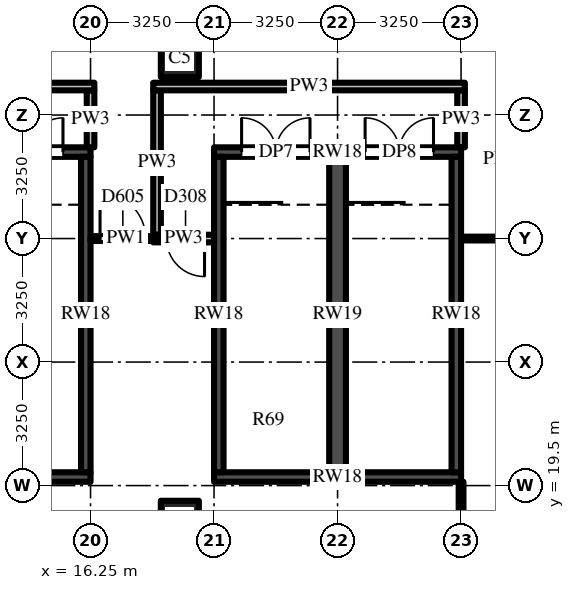
"""IFC4 building model, lengths in metres.
Left out: names, types, materials, properties, quantities, classifications, styles, units other than length and angle.
Written with IfcOpenShell. Run it as: python <this file> out.ifc"""

import sys

from ifc_helpers import new_model, si_unit, direction, frame, frame_2d, origin, origin_2d, place, context, subcontext, project, spatial, rectangle, extrude, source, transform, mapped, element, fill, save


model = new_model("IFC4")
c1 = context("Model", 3, precision=1e-05, world=origin(), true_north=direction((0.0, 1.0)))
c2 = subcontext(c1, "Body", "Model", "MODEL_VIEW")
j1 = project(units=[si_unit("LENGTHUNIT", "METRE"), si_unit("PLANEANGLEUNIT", "RADIAN")], contexts=[c1])
p1 = place(None, origin())
s1 = spatial("IfcSite", under=j1, at=p1, CompositionType="ELEMENT")
p2 = place(p1, origin())
s2 = spatial("IfcBuilding", under=s1, at=p2, CompositionType="ELEMENT")
p3 = place(p2, frame((0.0, 0.0, 29.0)))
s3 = spatial("IfcBuildingStorey", under=s2, at=p3, CompositionType="ELEMENT", Elevation=29.0)
m1 = source(origin(), c2, "Body", "SweptSolid", [
    extrude(rectangle(XDim=1.0, YDim=1.0, at=origin_2d()), origin(), (0.0, 0.0, 1.0), 5.0),
])
for number, where, z_axis, x_axis in (
    (1, (18.6, 18.6, 0.0), (0.0, 0.0, 1.0), (1.0, 0.0, 0.0)),
    (2, (18.6, 30.75, 0.0), (0.0, 0.0, 1.0), (1.0, 0.0, 0.0)),
):
    element("IfcColumn", number, at=place(p3, frame(where, z_axis=z_axis, x_axis=x_axis)), inside=s3, PredefinedType="COLUMN", context=c2, shape_type="MappedRepresentation", body=[
        mapped(m1, transform((0.0, 0.0, 0.0))),
    ])
m2 = source(origin(), c2, "Body", "SweptSolid", [
    extrude(rectangle(XDim=6.5, YDim=0.25, at=frame_2d((3.25, 0.0))), origin(), (0.0, 0.0, 1.0), 4.65),
])
p4 = place(p3, frame((9.75, 28.275, 0.0), z_axis=(0.0, 0.0, 1.0), x_axis=(1.0, 0.0, 0.0)))
e3 = element("IfcWall", 3, at=p4, inside=s3, PredefinedType="SHEAR", context=c2, shape_type="MappedRepresentation", body=[
    mapped(m2, transform((0.0, 0.0, 0.0))),
])
m3 = source(origin(), c2, "Body", "SweptSolid", [
    extrude(rectangle(XDim=1.8, YDim=2.1, at=frame_2d((0.9, 1.05))), frame((0.0, 0.135, 0.0), z_axis=(0.0, -1.0, 0.0), x_axis=(1.0, 0.0, 0.0)), (0.0, 0.0, 1.0), 0.27),
])
p5 = place(p4, frame((0.725, 0.0, 0.0)))
e4 = element("IfcOpeningElement", 4, at=p5, cuts=e3, PredefinedType="OPENING", context=c2, shape_type="MappedRepresentation", body=[
    mapped(m3, transform((0.0, 0.0, 0.0))),
])
p6 = place(p4, frame((3.975, 0.0, 0.0)))
e5 = element("IfcOpeningElement", 5, at=p6, cuts=e3, PredefinedType="OPENING", context=c2, shape_type="MappedRepresentation", body=[
    mapped(m3, transform((0.0, 0.0, 0.0))),
])
p7 = place(p3, frame((9.75, 19.725, 0.0), z_axis=(0.0, 0.0, 1.0), x_axis=(1.0, 0.0, 0.0)))
e6 = element("IfcWall", 6, at=p7, inside=s3, PredefinedType="SHEAR", context=c2, shape_type="MappedRepresentation", body=[
    mapped(m2, transform((0.0, 0.0, 0.0))),
])
m4 = source(origin(), c2, "Body", "SweptSolid", [
    extrude(rectangle(XDim=8.3, YDim=0.25, at=frame_2d((4.15, 0.0))), origin(), (0.0, 0.0, 1.0), 4.65),
])
p8 = place(p3, frame((16.125, 19.85, 0.0), z_axis=(0.0, 0.0, 1.0), x_axis=(0.0, 1.0, 0.0)))
e7 = element("IfcWall", 7, at=p8, inside=s3, PredefinedType="SHEAR", context=c2, shape_type="MappedRepresentation", body=[
    mapped(m4, transform((0.0, 0.0, 0.0))),
])
p9 = place(p3, frame((19.5, 28.275, 0.0), z_axis=(0.0, 0.0, 1.0), x_axis=(1.0, 0.0, 0.0)))
e8 = element("IfcWall", 8, at=p9, inside=s3, PredefinedType="SHEAR", context=c2, shape_type="MappedRepresentation", body=[
    mapped(m2, transform((0.0, 0.0, 0.0))),
])
p10 = place(p9, frame((0.725, 0.0, 0.0)))
e9 = element("IfcOpeningElement", 9, at=p10, cuts=e8, PredefinedType="OPENING", context=c2, shape_type="MappedRepresentation", body=[
    mapped(m3, transform((0.0, 0.0, 0.0))),
])
p11 = place(p9, frame((3.975, 0.0, 0.0)))
e10 = element("IfcOpeningElement", 10, at=p11, cuts=e8, PredefinedType="OPENING", context=c2, shape_type="MappedRepresentation", body=[
    mapped(m3, transform((0.0, 0.0, 0.0))),
])
p12 = place(p3, frame((19.5, 19.725, 0.0), z_axis=(0.0, 0.0, 1.0), x_axis=(1.0, 0.0, 0.0)))
e11 = element("IfcWall", 11, at=p12, inside=s3, PredefinedType="SHEAR", context=c2, shape_type="MappedRepresentation", body=[
    mapped(m2, transform((0.0, 0.0, 0.0))),
])
for number, where, z_axis, x_axis in (
    (12, (19.625, 19.85, 0.0), (0.0, 0.0, 1.0), (0.0, 1.0, 0.0)),
    (13, (25.875, 19.85, 0.0), (0.0, 0.0, 1.0), (0.0, 1.0, 0.0)),
):
    element("IfcWall", number, at=place(p3, frame(where, z_axis=z_axis, x_axis=x_axis)), inside=s3, PredefinedType="SHEAR", context=c2, shape_type="MappedRepresentation", body=[
        mapped(m4, transform((0.0, 0.0, 0.0))),
    ])
m5 = source(origin(), c2, "Body", "SweptSolid", [
    extrude(rectangle(XDim=8.3, YDim=0.44, at=frame_2d((4.15, 0.0))), origin(), (0.0, 0.0, 1.0), 4.65),
])
p13 = place(p3, frame((22.75, 19.85, 0.0), z_axis=(0.0, 0.0, 1.0), x_axis=(0.0, 1.0, 0.0)))
e14 = element("IfcWall", 14, at=p13, inside=s3, PredefinedType="SHEAR", context=c2, shape_type="MappedRepresentation", body=[
    mapped(m5, transform((0.0, 0.0, 0.0))),
])
m6 = source(origin(), c2, "Body", "SweptSolid", [
    extrude(rectangle(XDim=1.5, YDim=0.2, at=frame_2d((0.75, 0.0))), origin(), (0.0, 0.0, 1.0), 4.65),
])
p14 = place(p3, frame((16.25, 29.9, 0.0), z_axis=(0.0, 0.0, 1.0), x_axis=(0.0, -1.0, 0.0)))
e15 = element("IfcWall", 15, at=p14, inside=s3, PredefinedType="PARTITIONING", context=c2, shape_type="MappedRepresentation", body=[
    mapped(m6, transform((0.0, 0.0, 0.0))),
])
m7 = source(origin(), c2, "Body", "SweptSolid", [
    extrude(rectangle(XDim=3.8, YDim=0.2, at=frame_2d((1.9, 0.0))), origin(), (0.0, 0.0, 1.0), 4.224),
])
p15 = place(p3, frame((18.0, 29.9, 0.0), z_axis=(0.0, 0.0, 1.0), x_axis=(0.0, -1.0, 0.0)))
e16 = element("IfcWall", 16, at=p15, inside=s3, PredefinedType="PARTITIONING", context=c2, shape_type="MappedRepresentation", body=[
    mapped(m7, transform((0.0, 0.0, 0.0))),
])
p16 = place(p3, frame((26.0, 29.9, 0.0), z_axis=(0.0, 0.0, 1.0), x_axis=(0.0, -1.0, 0.0)))
e17 = element("IfcWall", 17, at=p16, inside=s3, PredefinedType="PARTITIONING", context=c2, shape_type="MappedRepresentation", body=[
    mapped(m6, transform((0.0, 0.0, 0.0))),
])
m8 = source(origin(), c2, "Body", "SweptSolid", [
    extrude(rectangle(XDim=16.25, YDim=0.125, at=frame_2d((8.125, 0.0))), origin(), (0.0, 0.0, 1.0), 2.83),
])
p17 = place(p3, frame((26.0, 19.6, 0.0), z_axis=(0.0, 0.0, 1.0), x_axis=(0.0, -1.0, 0.0)))
e18 = element("IfcWall", 18, at=p17, inside=s3, PredefinedType="PARTITIONING", context=c2, shape_type="MappedRepresentation", body=[
    mapped(m8, transform((0.0, 0.0, 0.0))),
])
m9 = source(origin(), c2, "Body", "SweptSolid", [
    extrude(rectangle(XDim=1.0, YDim=2.1, at=frame_2d((0.5, 1.05))), frame((0.0, 0.073, 0.0), z_axis=(0.0, -1.0, 0.0), x_axis=(1.0, 0.0, 0.0)), (0.0, 0.0, 1.0), 0.145),
])
p18 = place(p17, frame((11.75, 0.0, 0.0)))
e19 = element("IfcOpeningElement", 19, at=p18, cuts=e18, PredefinedType="OPENING", context=c2, shape_type="MappedRepresentation", body=[
    mapped(m9, transform((0.0, 0.0, 0.0))),
])
m10 = source(origin(), c2, "Body", "SweptSolid", [
    extrude(rectangle(XDim=1.6, YDim=0.2, at=frame_2d((0.8, 0.0))), origin(), (0.0, 0.0, 1.0), 3.712),
])
p19 = place(p3, frame((19.5, 26.0, 0.0), z_axis=(0.0, 0.0, 1.0), x_axis=(-1.0, 0.0, 0.0)))
e20 = element("IfcWall", 20, at=p19, inside=s3, PredefinedType="PARTITIONING", context=c2, shape_type="MappedRepresentation", body=[
    mapped(m10, transform((0.0, 0.0, 0.0))),
])
m11 = source(origin(), c2, "Body", "SweptSolid", [
    extrude(rectangle(XDim=1.0, YDim=2.1, at=frame_2d((0.5, 1.05))), frame((0.0, 0.11, 0.0), z_axis=(0.0, -1.0, 0.0), x_axis=(1.0, 0.0, 0.0)), (0.0, 0.0, 1.0), 0.22),
])
p20 = place(p19, frame((0.25, 0.0, 0.0)))
e21 = element("IfcOpeningElement", 21, at=p20, cuts=e20, PredefinedType="OPENING", context=c2, shape_type="MappedRepresentation", body=[
    mapped(m11, transform((0.0, 0.0, 0.0))),
])
m12 = source(origin(), c2, "Body", "SweptSolid", [
    extrude(rectangle(XDim=6.3, YDim=0.1, at=frame_2d((3.15, 0.0))), origin(), (0.0, 0.0, 1.0), 3.73),
])
p21 = place(p3, frame((26.0, 26.0, 0.0), z_axis=(0.0, 0.0, 1.0), x_axis=(1.0, 0.0, 0.0)))
e22 = element("IfcWall", 22, at=p21, inside=s3, PredefinedType="PARTITIONING", context=c2, shape_type="MappedRepresentation", body=[
    mapped(m12, transform((0.0, 0.0, 0.0))),
])
m13 = source(origin(), c2, "Body", "SweptSolid", [
    extrude(rectangle(XDim=1.85, YDim=0.125, at=frame_2d((0.925, 0.0))), origin(), (0.0, 0.0, 1.0), 4.65),
])
p22 = place(p3, frame((16.25, 26.0, 0.0), z_axis=(0.0, 0.0, 1.0), x_axis=(1.0, 0.0, 0.0)))
e23 = element("IfcWall", 23, at=p22, inside=s3, PredefinedType="PARTITIONING", context=c2, shape_type="MappedRepresentation", body=[
    mapped(m13, transform((0.0, 0.0, 0.0))),
])
m14 = source(origin(), c2, "Body", "SweptSolid", [
    extrude(rectangle(XDim=1.2, YDim=2.1, at=frame_2d((0.6, 1.05))), frame((0.0, 0.073, 0.0), z_axis=(0.0, -1.0, 0.0), x_axis=(1.0, 0.0, 0.0)), (0.0, 0.0, 1.0), 0.145),
])
p23 = place(p22, frame((0.25, 0.0, 0.0)))
e24 = element("IfcOpeningElement", 24, at=p23, cuts=e23, PredefinedType="OPENING", context=c2, shape_type="MappedRepresentation", body=[
    mapped(m14, transform((0.0, 0.0, 0.0))),
])
m15 = source(origin(), c2, "Body", "SweptSolid", [
    extrude(rectangle(XDim=8.2, YDim=0.2, at=frame_2d((4.1, 0.0))), origin(), (0.0, 0.0, 1.0), 4.65),
])
p24 = place(p3, frame((16.35, 30.0, 0.0), z_axis=(0.0, 0.0, 1.0), x_axis=(-1.0, 0.0, 0.0)))
e25 = element("IfcWall", 25, at=p24, inside=s3, PredefinedType="PARTITIONING", context=c2, shape_type="MappedRepresentation", body=[
    mapped(m15, transform((0.0, 0.0, 0.0))),
])
m16 = source(origin(), c2, "Body", "SweptSolid", [
    extrude(rectangle(XDim=8.2, YDim=0.2, at=frame_2d((4.1, 0.0))), origin(), (0.0, 0.0, 1.0), 3.712),
])
p25 = place(p3, frame((26.1, 30.0, 0.0), z_axis=(0.0, 0.0, 1.0), x_axis=(-1.0, 0.0, 0.0)))
e26 = element("IfcWall", 26, at=p25, inside=s3, PredefinedType="PARTITIONING", context=c2, shape_type="MappedRepresentation", body=[
    mapped(m16, transform((0.0, 0.0, 0.0))),
])
m17 = source(origin(), c2, "Body", "SweptSolid", [
    extrude(rectangle(XDim=1.8, YDim=2.1, at=frame_2d((0.9, 1.05))), frame((0.0, 0.025, 0.0), z_axis=(0.0, -1.0, 0.0), x_axis=(1.0, 0.0, 0.0)), (0.0, 0.0, 1.0), 0.05),
])
p26 = place(p6, origin())
e27 = element("IfcDoor", 27, at=p26, inside=s3, OperationType="DOUBLE_DOOR_SINGLE_SWING", PredefinedType="DOOR", context=c2, shape_type="MappedRepresentation", body=[
    mapped(m17, transform((0.0, 0.0, 0.0))),
])
fill(e5, e27)
p27 = place(p10, origin())
e28 = element("IfcDoor", 28, at=p27, inside=s3, OperationType="DOUBLE_DOOR_SINGLE_SWING", PredefinedType="DOOR", context=c2, shape_type="MappedRepresentation", body=[
    mapped(m17, transform((0.0, 0.0, 0.0))),
])
fill(e9, e28)
p28 = place(p11, origin())
e29 = element("IfcDoor", 29, at=p28, inside=s3, OperationType="DOUBLE_DOOR_SINGLE_SWING", PredefinedType="DOOR", context=c2, shape_type="MappedRepresentation", body=[
    mapped(m17, transform((0.0, 0.0, 0.0))),
])
fill(e10, e29)
m18 = source(origin(), c2, "Body", "SweptSolid", [
    extrude(rectangle(XDim=1.2, YDim=2.1, at=frame_2d((0.6, 1.05))), frame((0.0, 0.025, 0.0), z_axis=(0.0, -1.0, 0.0), x_axis=(1.0, 0.0, 0.0)), (0.0, 0.0, 1.0), 0.05),
])
p29 = place(p23, origin())
e30 = element("IfcDoor", 30, at=p29, inside=s3, OperationType="SINGLE_SWING_LEFT", PredefinedType="DOOR", context=c2, shape_type="MappedRepresentation", body=[
    mapped(m18, transform((0.0, 0.0, 0.0))),
])
fill(e24, e30)
m19 = source(origin(), c2, "Body", "SweptSolid", [
    extrude(rectangle(XDim=1.0, YDim=2.1, at=frame_2d((0.5, 1.05))), frame((0.0, 0.025, 0.0), z_axis=(0.0, -1.0, 0.0), x_axis=(1.0, 0.0, 0.0)), (0.0, 0.0, 1.0), 0.05),
])
p30 = place(p20, origin())
e31 = element("IfcDoor", 31, at=p30, inside=s3, OperationType="SINGLE_SWING_LEFT", PredefinedType="DOOR", context=c2, shape_type="MappedRepresentation", body=[
    mapped(m19, transform((0.0, 0.0, 0.0))),
])
fill(e21, e31)
save(model, sys.argv[1])
